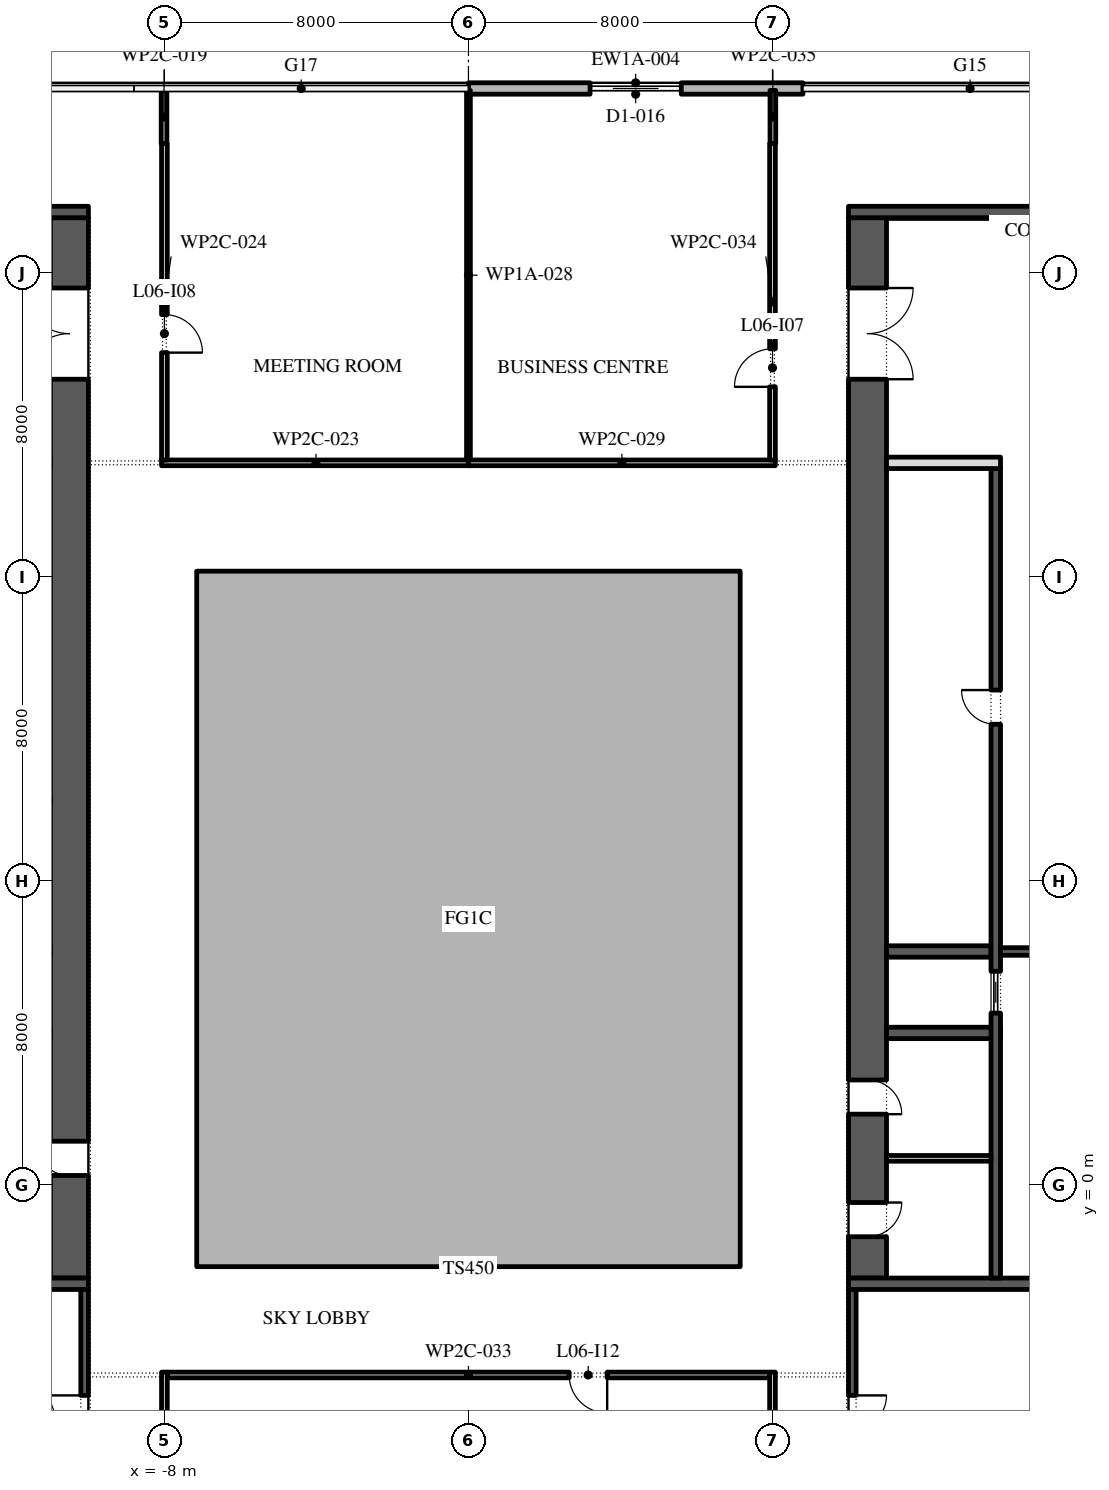
"""IFC4 building model, lengths in metres.
Left out: names, types, materials, properties, quantities, classifications, styles, units other than length and angle.
Written with IfcOpenShell. Run it as: python <this file> out.ifc"""

import sys

from ifc_helpers import new_model, si_unit, direction, frame, frame_2d, origin, place, context, subcontext, project, spatial, polyline, rectangle, outline, extrude, element, fill, save


model = new_model("IFC4")
c1 = context("Model", 3, precision=1e-05, world=origin(), true_north=direction((0.0, 1.0)))
c2 = subcontext(c1, "Body", "Model", "MODEL_VIEW")
j1 = project(units=[si_unit("LENGTHUNIT", "METRE"), si_unit("PLANEANGLEUNIT", "RADIAN")], contexts=[c1])
p1 = place(None, origin())
s1 = spatial("IfcSite", under=j1, at=p1, CompositionType="ELEMENT")
p2 = place(p1, origin())
s2 = spatial("IfcBuilding", under=s1, at=p2, CompositionType="ELEMENT")
p3 = place(p2, frame((0.0, 0.0, 33.6)))
s3 = spatial("IfcBuildingStorey", under=s2, at=p3, CompositionType="ELEMENT", Elevation=33.6)
p4 = place(p3, origin())
e1 = element("IfcWall", 1, at=p4, inside=s3, PredefinedType="STANDARD", context=c2, shape_type="SweptSolid", body=[
    extrude(outline(polyline([(-7.15, -2.15), (7.15, -2.15), (7.15, 16.15), (-7.15, 16.15), (-7.15, -2.15)]), holes=[polyline([(-7.0, -2.0), (-7.0, 16.0), (7.0, 16.0), (7.0, -2.0), (-7.0, -2.0)])]), origin(), (0.0, 0.0, 1.0), 5.8),
])
p5 = place(p3, frame((8.8, 28.85, 0.0), z_axis=(0.0, 0.0, 1.0), x_axis=(-1.0, 0.0, 0.0)))
e2 = element("IfcWall", 2, at=p5, inside=s3, PredefinedType="STANDARD", context=c2, shape_type="SweptSolid", body=[
    extrude(rectangle(XDim=8.8, YDim=0.3, at=frame_2d((4.4, 0.0))), origin(), (0.0, 0.0, 1.0), 5.8),
])
p6 = place(p5, frame((3.2, 0.0, 0.0)))
e3 = element("IfcOpeningElement", 3, at=p6, cuts=e2, PredefinedType="OPENING", context=c2, shape_type="SweptSolid", body=[
    extrude(rectangle(XDim=2.4, YDim=3.5, at=frame_2d((1.2, 1.75))), frame((0.0, 0.16, 0.0), z_axis=(0.0, -1.0, 0.0), x_axis=(1.0, 0.0, 0.0)), (0.0, 0.0, 1.0), 0.32),
])
p7 = place(p3, frame((-10.5, -2.45, 0.0), z_axis=(0.0, 0.0, 1.0), x_axis=(0.0, 1.0, 0.0)))
e4 = element("IfcWall", 4, at=p7, inside=s3, PredefinedType="SHEAR", context=c2, shape_type="SweptSolid", body=[
    extrude(rectangle(XDim=27.9, YDim=1.0, at=frame_2d((13.95, 0.0))), origin(), (0.0, 0.0, 1.0), 5.8),
])
p8 = place(p7, frame((23.65, 0.0, 0.0)))
e5 = element("IfcOpeningElement", 5, at=p8, cuts=e4, PredefinedType="OPENING", context=c2, shape_type="SweptSolid", body=[
    extrude(rectangle(XDim=2.4, YDim=2.1, at=frame_2d((1.2, 1.05))), frame((0.0, 0.51, 0.0), z_axis=(0.0, -1.0, 0.0), x_axis=(1.0, 0.0, 0.0)), (0.0, 0.0, 1.0), 1.02),
])
p9 = place(p7, frame((2.7, 0.0, 0.0)))
e6 = element("IfcOpeningElement", 6, at=p9, cuts=e4, PredefinedType="OPENING", context=c2, shape_type="SweptSolid", body=[
    extrude(rectangle(XDim=0.9, YDim=2.1, at=frame_2d((0.45, 1.05))), frame((0.0, 0.51, 0.0), z_axis=(0.0, -1.0, 0.0), x_axis=(1.0, 0.0, 0.0)), (0.0, 0.0, 1.0), 1.02),
])
for number, where, z_axis, x_axis in (
    (7, (-22.0, -2.6, 0.0), (0.0, 0.0, 1.0), (1.0, 0.0, 0.0)),
    (8, (-22.0, 25.6, 0.0), (0.0, 0.0, 1.0), (1.0, 0.0, 0.0)),
):
    element("IfcWall", number, at=place(p3, frame(where, z_axis=z_axis, x_axis=x_axis)), inside=s3, PredefinedType="SHEAR", context=c2, shape_type="SweptSolid", body=[
        extrude(rectangle(XDim=12.0, YDim=0.3, at=frame_2d((6.0, 0.0))), origin(), (0.0, 0.0, 1.0), 5.8),
    ])
p10 = place(p3, frame((-10.1, -15.8, 0.0), z_axis=(0.0, 0.0, 1.0), x_axis=(0.0, 1.0, 0.0)))
e9 = element("IfcWall", 9, at=p10, inside=s3, PredefinedType="SHEAR", context=c2, shape_type="SweptSolid", body=[
    extrude(rectangle(XDim=13.05, YDim=0.2, at=frame_2d((6.525, 0.0))), origin(), (0.0, 0.0, 1.0), 5.8),
])
p11 = place(p10, frame((1.175, 0.0, 0.0)))
e10 = element("IfcOpeningElement", 10, at=p11, cuts=e9, PredefinedType="OPENING", context=c2, shape_type="SweptSolid", body=[
    extrude(rectangle(XDim=0.9, YDim=2.1, at=frame_2d((0.45, 1.05))), frame((0.0, 0.11, 0.0), z_axis=(0.0, -1.0, 0.0), x_axis=(1.0, 0.0, 0.0)), (0.0, 0.0, 1.0), 0.22),
])
p12 = place(p10, frame((4.413, 0.0, 0.0)))
e11 = element("IfcOpeningElement", 11, at=p12, cuts=e9, PredefinedType="OPENING", context=c2, shape_type="SweptSolid", body=[
    extrude(rectangle(XDim=1.0, YDim=2.1, at=frame_2d((0.5, 1.05))), frame((0.0, 0.11, 0.0), z_axis=(0.0, -1.0, 0.0), x_axis=(1.0, 0.0, 0.0)), (0.0, 0.0, 1.0), 0.22),
])
p13 = place(p10, frame((9.363, 0.0, 0.0)))
e12 = element("IfcOpeningElement", 12, at=p13, cuts=e9, PredefinedType="OPENING", context=c2, shape_type="SweptSolid", body=[
    extrude(rectangle(XDim=0.9, YDim=2.1, at=frame_2d((0.45, 1.05))), frame((0.0, 0.11, 0.0), z_axis=(0.0, -1.0, 0.0), x_axis=(1.0, 0.0, 0.0)), (0.0, 0.0, 1.0), 0.22),
])
p14 = place(p3, frame((10.5, -2.45, 0.0), z_axis=(0.0, 0.0, 1.0), x_axis=(0.0, 1.0, 0.0)))
e13 = element("IfcWall", 13, at=p14, inside=s3, PredefinedType="SHEAR", context=c2, shape_type="SweptSolid", body=[
    extrude(rectangle(XDim=27.9, YDim=1.0, at=frame_2d((13.95, 0.0))), origin(), (0.0, 0.0, 1.0), 5.8),
])
p15 = place(p14, frame((23.65, 0.0, 0.0)))
e14 = element("IfcOpeningElement", 14, at=p15, cuts=e13, PredefinedType="OPENING", context=c2, shape_type="SweptSolid", body=[
    extrude(rectangle(XDim=2.4, YDim=2.1, at=frame_2d((1.2, 1.05))), frame((0.0, 0.51, 0.0), z_axis=(0.0, -1.0, 0.0), x_axis=(1.0, 0.0, 0.0)), (0.0, 0.0, 1.0), 1.02),
])
p16 = place(p14, frame((1.087, 0.0, 0.0)))
e15 = element("IfcOpeningElement", 15, at=p16, cuts=e13, PredefinedType="OPENING", context=c2, shape_type="SweptSolid", body=[
    extrude(rectangle(XDim=0.9, YDim=2.1, at=frame_2d((0.45, 1.05))), frame((0.0, 0.51, 0.0), z_axis=(0.0, -1.0, 0.0), x_axis=(1.0, 0.0, 0.0)), (0.0, 0.0, 1.0), 1.02),
])
p17 = place(p14, frame((4.312, 0.0, 0.0)))
e16 = element("IfcOpeningElement", 16, at=p17, cuts=e13, PredefinedType="OPENING", context=c2, shape_type="SweptSolid", body=[
    extrude(rectangle(XDim=0.9, YDim=2.1, at=frame_2d((0.45, 1.05))), frame((0.0, 0.51, 0.0), z_axis=(0.0, -1.0, 0.0), x_axis=(1.0, 0.0, 0.0)), (0.0, 0.0, 1.0), 1.02),
])
for number, where, z_axis, x_axis in (
    (17, (10.0, -2.6, 0.0), (0.0, 0.0, 1.0), (1.0, 0.0, 0.0)),
    (18, (10.0, 25.6, 0.0), (0.0, 0.0, 1.0), (1.0, 0.0, 0.0)),
):
    element("IfcWall", number, at=place(p3, frame(where, z_axis=z_axis, x_axis=x_axis)), inside=s3, PredefinedType="SHEAR", context=c2, shape_type="SweptSolid", body=[
        extrude(rectangle(XDim=12.0, YDim=0.3, at=frame_2d((6.0, 0.0))), origin(), (0.0, 0.0, 1.0), 5.8),
    ])
p18 = place(p3, frame((11.0, 4.0, 0.0), z_axis=(0.0, 0.0, 1.0), x_axis=(1.0, 0.0, 0.0)))
e19 = element("IfcWall", 19, at=p18, inside=s3, PredefinedType="SHEAR", context=c2, shape_type="SweptSolid", body=[
    extrude(rectangle(XDim=3.0, YDim=0.3, at=frame_2d((1.5, 0.0))), origin(), (0.0, 0.0, 1.0), 5.8),
])
p19 = place(p3, frame((11.0, 6.143, 0.0), z_axis=(0.0, 0.0, 1.0), x_axis=(1.0, 0.0, 0.0)))
e20 = element("IfcWall", 20, at=p19, inside=s3, PredefinedType="SHEAR", context=c2, shape_type="SweptSolid", body=[
    extrude(rectangle(XDim=2.75, YDim=0.3, at=frame_2d((1.375, 0.0))), origin(), (0.0, 0.0, 1.0), 5.8),
])
p20 = place(p3, frame((13.875, -2.45, 0.0), z_axis=(0.0, 0.0, 1.0), x_axis=(0.0, 1.0, 0.0)))
e21 = element("IfcWall", 21, at=p20, inside=s3, PredefinedType="SHEAR", context=c2, shape_type="SweptSolid", body=[
    extrude(rectangle(XDim=21.3, YDim=0.25, at=frame_2d((10.65, 0.0))), origin(), (0.0, 0.0, 1.0), 5.8),
])
p21 = place(p20, frame((14.571, 0.0, 0.0)))
e22 = element("IfcOpeningElement", 22, at=p21, cuts=e21, PredefinedType="OPENING", context=c2, shape_type="SweptSolid", body=[
    extrude(rectangle(XDim=0.9, YDim=2.1, at=frame_2d((0.45, 1.05))), frame((0.0, 0.135, 0.0), z_axis=(0.0, -1.0, 0.0), x_axis=(1.0, 0.0, 0.0)), (0.0, 0.0, 1.0), 0.27),
])
p22 = place(p20, frame((6.971, 0.0, 0.0)))
e23 = element("IfcOpeningElement", 23, at=p22, cuts=e21, PredefinedType="OPENING", context=c2, shape_type="SweptSolid", body=[
    extrude(rectangle(XDim=1.1, YDim=2.1, at=frame_2d((0.55, 1.05))), frame((0.0, 0.135, 0.0), z_axis=(0.0, -1.0, 0.0), x_axis=(1.0, 0.0, 0.0)), (0.0, 0.0, 1.0), 0.27),
])
p23 = place(p3, frame((11.0, 19.0, 0.0), z_axis=(0.0, 0.0, 1.0), x_axis=(1.0, 0.0, 0.0)))
e24 = element("IfcWall", 24, at=p23, inside=s3, PredefinedType="PARTITIONING", context=c2, shape_type="SweptSolid", body=[
    extrude(rectangle(XDim=3.0, YDim=0.3, at=frame_2d((1.5, 0.0))), origin(), (0.0, 0.0, 1.0), 5.8),
])
p24 = place(p3, frame((14.0, 6.143, 0.0), z_axis=(0.0, 0.0, 1.0), x_axis=(1.0, 0.0, 0.0)))
e25 = element("IfcWall", 25, at=p24, inside=s3, PredefinedType="SHEAR", context=c2, shape_type="SweptSolid", body=[
    extrude(rectangle(XDim=4.0, YDim=0.2, at=frame_2d((2.0, 0.0))), origin(), (0.0, 0.0, 1.0), 5.8),
])
p25 = place(p24, frame((1.4, 0.0, 0.0)))
e26 = element("IfcOpeningElement", 26, at=p25, cuts=e25, PredefinedType="OPENING", context=c2, shape_type="SweptSolid", body=[
    extrude(rectangle(XDim=1.2, YDim=2.1, at=frame_2d((0.6, 1.05))), frame((0.0, 0.11, 0.0), z_axis=(0.0, -1.0, 0.0), x_axis=(1.0, 0.0, 0.0)), (0.0, 0.0, 1.0), 0.22),
])
p26 = place(p3, frame((11.0, 0.7, 0.0), z_axis=(0.0, 0.0, 1.0), x_axis=(1.0, 0.0, 0.0)))
e27 = element("IfcWall", 27, at=p26, inside=s3, PredefinedType="PARTITIONING", context=c2, shape_type="SweptSolid", body=[
    extrude(rectangle(XDim=2.75, YDim=0.15, at=frame_2d((1.375, 0.0))), origin(), (0.0, 0.0, 1.0), 5.8),
])
p27 = place(p3, frame((10.1, -15.8, 0.0), z_axis=(0.0, 0.0, 1.0), x_axis=(0.0, 1.0, 0.0)))
e28 = element("IfcWall", 28, at=p27, inside=s3, PredefinedType="SHEAR", context=c2, shape_type="SweptSolid", body=[
    extrude(rectangle(XDim=13.05, YDim=0.2, at=frame_2d((6.525, 0.0))), origin(), (0.0, 0.0, 1.0), 5.8),
])
p28 = place(p27, frame((2.762, 0.0, 0.0)))
e29 = element("IfcOpeningElement", 29, at=p28, cuts=e28, PredefinedType="OPENING", context=c2, shape_type="SweptSolid", body=[
    extrude(rectangle(XDim=0.9, YDim=2.1, at=frame_2d((0.45, 1.05))), frame((0.0, 0.11, 0.0), z_axis=(0.0, -1.0, 0.0), x_axis=(1.0, 0.0, 0.0)), (0.0, 0.0, 1.0), 0.22),
])
p29 = place(p27, frame((9.363, 0.0, 0.0)))
e30 = element("IfcOpeningElement", 30, at=p29, cuts=e28, PredefinedType="OPENING", context=c2, shape_type="SweptSolid", body=[
    extrude(rectangle(XDim=0.9, YDim=2.1, at=frame_2d((0.45, 1.05))), frame((0.0, 0.11, 0.0), z_axis=(0.0, -1.0, 0.0), x_axis=(1.0, 0.0, 0.0)), (0.0, 0.0, 1.0), 0.22),
])
p30 = place(p3, frame((-8.01, 28.8, 0.0), z_axis=(0.0, 0.0, 1.0), x_axis=(0.0, -1.0, 0.0)))
e31 = element("IfcWall", 31, at=p30, inside=s3, PredefinedType="PARTITIONING", context=c2, shape_type="SweptSolid", body=[
    extrude(rectangle(XDim=1.4, YDim=0.15, at=frame_2d((0.7, 0.0))), origin(), (0.0, 0.0, 1.0), 5.8),
])
p31 = place(p3, frame((-8.0, -4.925, 0.0), z_axis=(0.0, 0.0, 1.0), x_axis=(0.0, -1.0, 0.0)))
e32 = element("IfcWall", 32, at=p31, inside=s3, PredefinedType="PARTITIONING", context=c2, shape_type="SweptSolid", body=[
    extrude(rectangle(XDim=5.195, YDim=0.15, at=frame_2d((2.598, 0.0))), origin(), (0.0, 0.0, 1.0), 5.8),
])
p32 = place(p3, frame((-8.075, 19.0, 0.0), z_axis=(0.0, 0.0, 1.0), x_axis=(1.0, 0.0, 0.0)))
e33 = element("IfcWall", 33, at=p32, inside=s3, PredefinedType="PARTITIONING", context=c2, shape_type="SweptSolid", body=[
    extrude(rectangle(XDim=8.125, YDim=0.15, at=frame_2d((4.062, 0.0))), origin(), (0.0, 0.0, 1.0), 5.8),
])
p33 = place(p3, frame((-8.0, 27.4, 0.0), z_axis=(0.0, 0.0, 1.0), x_axis=(0.0, -1.0, 0.0)))
e34 = element("IfcWall", 34, at=p33, inside=s3, PredefinedType="PARTITIONING", context=c2, shape_type="SweptSolid", body=[
    extrude(rectangle(XDim=8.325, YDim=0.15, at=frame_2d((4.163, 0.0))), origin(), (0.0, 0.0, 1.0), 5.8),
])
p34 = place(p33, frame((4.5, 0.0, 0.0)))
e35 = element("IfcOpeningElement", 35, at=p34, cuts=e34, PredefinedType="OPENING", context=c2, shape_type="SweptSolid", body=[
    extrude(rectangle(XDim=1.0, YDim=2.1, at=frame_2d((0.5, 1.05))), frame((0.0, 0.085, 0.0), z_axis=(0.0, -1.0, 0.0), x_axis=(1.0, 0.0, 0.0)), (0.0, 0.0, 1.0), 0.17),
])
p35 = place(p3, frame((0.0, 19.075, 0.0), z_axis=(0.0, 0.0, 1.0), x_axis=(0.0, 1.0, 0.0)))
e36 = element("IfcWall", 36, at=p35, inside=s3, PredefinedType="PARTITIONING", context=c2, shape_type="SweptSolid", body=[
    extrude(rectangle(XDim=9.725, YDim=0.1, at=frame_2d((4.863, 0.0))), origin(), (0.0, 0.0, 1.0), 5.8),
])
p36 = place(p3, frame((0.0, 19.0, 0.0), z_axis=(0.0, 0.0, 1.0), x_axis=(1.0, 0.0, 0.0)))
e37 = element("IfcWall", 37, at=p36, inside=s3, PredefinedType="PARTITIONING", context=c2, shape_type="SweptSolid", body=[
    extrude(rectangle(XDim=8.075, YDim=0.15, at=frame_2d((4.038, 0.0))), origin(), (0.0, 0.0, 1.0), 5.8),
])
p37 = place(p3, frame((8.0, -10.12, 0.0), z_axis=(0.0, 0.0, 1.0), x_axis=(0.0, 1.0, 0.0)))
e38 = element("IfcWall", 38, at=p37, inside=s3, PredefinedType="PARTITIONING", context=c2, shape_type="SweptSolid", body=[
    extrude(rectangle(XDim=5.195, YDim=0.15, at=frame_2d((2.598, 0.0))), origin(), (0.0, 0.0, 1.0), 5.8),
])
p38 = place(p3, frame((7.925, -5.0, 0.0), z_axis=(0.0, 0.0, 1.0), x_axis=(-1.0, 0.0, 0.0)))
e39 = element("IfcWall", 39, at=p38, inside=s3, PredefinedType="PARTITIONING", context=c2, shape_type="SweptSolid", body=[
    extrude(rectangle(XDim=15.85, YDim=0.15, at=frame_2d((7.925, 0.0))), origin(), (0.0, 0.0, 1.0), 5.8),
])
p39 = place(p38, frame((4.275, 0.0, 0.0)))
e40 = element("IfcOpeningElement", 40, at=p39, cuts=e39, PredefinedType="OPENING", context=c2, shape_type="SweptSolid", body=[
    extrude(rectangle(XDim=1.0, YDim=2.1, at=frame_2d((0.5, 1.05))), frame((0.0, 0.085, 0.0), z_axis=(0.0, -1.0, 0.0), x_axis=(1.0, 0.0, 0.0)), (0.0, 0.0, 1.0), 0.17),
])
p40 = place(p3, frame((8.0, 19.075, 0.0), z_axis=(0.0, 0.0, 1.0), x_axis=(0.0, 1.0, 0.0)))
e41 = element("IfcWall", 41, at=p40, inside=s3, PredefinedType="PARTITIONING", context=c2, shape_type="SweptSolid", body=[
    extrude(rectangle(XDim=8.325, YDim=0.15, at=frame_2d((4.163, 0.0))), origin(), (0.0, 0.0, 1.0), 5.8),
])
p41 = place(p40, frame((1.925, 0.0, 0.0)))
e42 = element("IfcOpeningElement", 42, at=p41, cuts=e41, PredefinedType="OPENING", context=c2, shape_type="SweptSolid", body=[
    extrude(rectangle(XDim=1.0, YDim=2.1, at=frame_2d((0.5, 1.05))), frame((0.0, 0.085, 0.0), z_axis=(0.0, -1.0, 0.0), x_axis=(1.0, 0.0, 0.0)), (0.0, 0.0, 1.0), 0.17),
])
p42 = place(p3, frame((8.01, 27.4, 0.0), z_axis=(0.0, 0.0, 1.0), x_axis=(0.0, 1.0, 0.0)))
e43 = element("IfcWall", 43, at=p42, inside=s3, PredefinedType="PARTITIONING", context=c2, shape_type="SweptSolid", body=[
    extrude(rectangle(XDim=1.4, YDim=0.15, at=frame_2d((0.7, 0.0))), origin(), (0.0, 0.0, 1.0), 5.8),
])
p43 = place(p6, origin())
e44 = element("IfcDoor", 44, at=p43, inside=s3, OperationType="DOUBLE_DOOR_SLIDING", PredefinedType="DOOR", context=c2, shape_type="SweptSolid", body=[
    extrude(rectangle(XDim=2.4, YDim=3.5, at=frame_2d((1.2, 1.75))), frame((0.0, 0.025, 0.0), z_axis=(0.0, -1.0, 0.0), x_axis=(1.0, 0.0, 0.0)), (0.0, 0.0, 1.0), 0.05),
])
fill(e3, e44)
p44 = place(p8, origin())
e45 = element("IfcDoor", 45, at=p44, inside=s3, OperationType="DOUBLE_DOOR_SINGLE_SWING", PredefinedType="DOOR", context=c2, shape_type="SweptSolid", body=[
    extrude(rectangle(XDim=2.4, YDim=2.1, at=frame_2d((1.2, 1.05))), frame((0.0, 0.025, 0.0), z_axis=(0.0, -1.0, 0.0), x_axis=(1.0, 0.0, 0.0)), (0.0, 0.0, 1.0), 0.05),
])
fill(e5, e45)
p45 = place(p13, origin())
e46 = element("IfcDoor", 46, at=p45, inside=s3, OperationType="SINGLE_SWING_LEFT", PredefinedType="DOOR", context=c2, shape_type="SweptSolid", body=[
    extrude(rectangle(XDim=0.9, YDim=2.1, at=frame_2d((0.45, 1.05))), frame((0.0, 0.1, 0.0), z_axis=(0.0, -1.0, 0.0), x_axis=(1.0, 0.0, 0.0)), (0.0, 0.0, 1.0), 0.05),
])
fill(e12, e46)
p46 = place(p21, origin())
e47 = element("IfcDoor", 47, at=p46, inside=s3, OperationType="SINGLE_SWING_LEFT", PredefinedType="DOOR", context=c2, shape_type="SweptSolid", body=[
    extrude(rectangle(XDim=0.9, YDim=2.1, at=frame_2d((0.45, 1.05))), frame((0.0, 0.125, 0.0), z_axis=(0.0, -1.0, 0.0), x_axis=(1.0, 0.0, 0.0)), (0.0, 0.0, 1.0), 0.05),
])
fill(e22, e47)
p47 = place(p22, origin())
e48 = element("IfcDoor", 48, at=p47, inside=s3, OperationType="SLIDING_TO_LEFT", PredefinedType="DOOR", context=c2, shape_type="SweptSolid", body=[
    extrude(rectangle(XDim=1.1, YDim=2.1, at=frame_2d((0.55, 1.05))), frame((0.0, 0.025, 0.0), z_axis=(0.0, -1.0, 0.0), x_axis=(1.0, 0.0, 0.0)), (0.0, 0.0, 1.0), 0.05),
])
fill(e23, e48)
p48 = place(p15, frame((2.4, 0.0, 0.0), z_axis=(0.0, 0.0, 1.0), x_axis=(-1.0, 0.0, 0.0)))
e49 = element("IfcDoor", 49, at=p48, inside=s3, OperationType="DOUBLE_DOOR_SINGLE_SWING", PredefinedType="DOOR", context=c2, shape_type="SweptSolid", body=[
    extrude(rectangle(XDim=2.4, YDim=2.1, at=frame_2d((1.2, 1.05))), frame((0.0, 0.025, 0.0), z_axis=(0.0, -1.0, 0.0), x_axis=(1.0, 0.0, 0.0)), (0.0, 0.0, 1.0), 0.05),
])
fill(e14, e49)
p49 = place(p16, frame((0.9, -0.95, 0.0), z_axis=(0.0, 0.0, 1.0), x_axis=(-1.0, 0.0, 0.0)))
e50 = element("IfcDoor", 50, at=p49, inside=s3, OperationType="SINGLE_SWING_RIGHT", PredefinedType="DOOR", context=c2, shape_type="SweptSolid", body=[
    extrude(rectangle(XDim=0.9, YDim=2.1, at=frame_2d((0.45, 1.05))), frame((0.0, -0.45, 0.0), z_axis=(0.0, -1.0, 0.0), x_axis=(1.0, 0.0, 0.0)), (0.0, 0.0, 1.0), 0.05),
])
fill(e15, e50)
p50 = place(p17, frame((0.9, -0.95, 0.0), z_axis=(0.0, 0.0, 1.0), x_axis=(-1.0, 0.0, 0.0)))
e51 = element("IfcDoor", 51, at=p50, inside=s3, OperationType="SINGLE_SWING_LEFT", PredefinedType="DOOR", context=c2, shape_type="SweptSolid", body=[
    extrude(rectangle(XDim=0.9, YDim=2.1, at=frame_2d((0.45, 1.05))), frame((0.0, -0.45, 0.0), z_axis=(0.0, -1.0, 0.0), x_axis=(1.0, 0.0, 0.0)), (0.0, 0.0, 1.0), 0.05),
])
fill(e16, e51)
p51 = place(p29, frame((0.9, -0.15, 0.0), z_axis=(0.0, 0.0, 1.0), x_axis=(-1.0, 0.0, 0.0)))
e52 = element("IfcDoor", 52, at=p51, inside=s3, OperationType="SINGLE_SWING_RIGHT", PredefinedType="DOOR", context=c2, shape_type="SweptSolid", body=[
    extrude(rectangle(XDim=0.9, YDim=2.1, at=frame_2d((0.45, 1.05))), frame((0.0, -0.05, 0.0), z_axis=(0.0, -1.0, 0.0), x_axis=(1.0, 0.0, 0.0)), (0.0, 0.0, 1.0), 0.05),
])
fill(e30, e52)
p52 = place(p41, origin())
e53 = element("IfcDoor", 53, at=p52, inside=s3, OperationType="SINGLE_SWING_RIGHT", PredefinedType="DOOR", context=c2, shape_type="SweptSolid", body=[
    extrude(rectangle(XDim=1.0, YDim=2.1, at=frame_2d((0.5, 1.05))), frame((0.0, 0.025, 0.0), z_axis=(0.0, -1.0, 0.0), x_axis=(1.0, 0.0, 0.0)), (0.0, 0.0, 1.0), 0.05),
])
fill(e42, e53)
p53 = place(p34, origin())
e54 = element("IfcDoor", 54, at=p53, inside=s3, OperationType="SINGLE_SWING_LEFT", PredefinedType="DOOR", context=c2, shape_type="SweptSolid", body=[
    extrude(rectangle(XDim=1.0, YDim=2.1, at=frame_2d((0.5, 1.05))), frame((0.0, 0.025, 0.0), z_axis=(0.0, -1.0, 0.0), x_axis=(1.0, 0.0, 0.0)), (0.0, 0.0, 1.0), 0.05),
])
fill(e35, e54)
p54 = place(p39, origin())
e55 = element("IfcDoor", 55, at=p54, inside=s3, OperationType="SINGLE_SWING_RIGHT", PredefinedType="DOOR", context=c2, shape_type="SweptSolid", body=[
    extrude(rectangle(XDim=1.0, YDim=2.1, at=frame_2d((0.5, 1.05))), frame((0.0, 0.025, 0.0), z_axis=(0.0, -1.0, 0.0), x_axis=(1.0, 0.0, 0.0)), (0.0, 0.0, 1.0), 0.05),
])
fill(e40, e55)
save(model, sys.argv[1])
